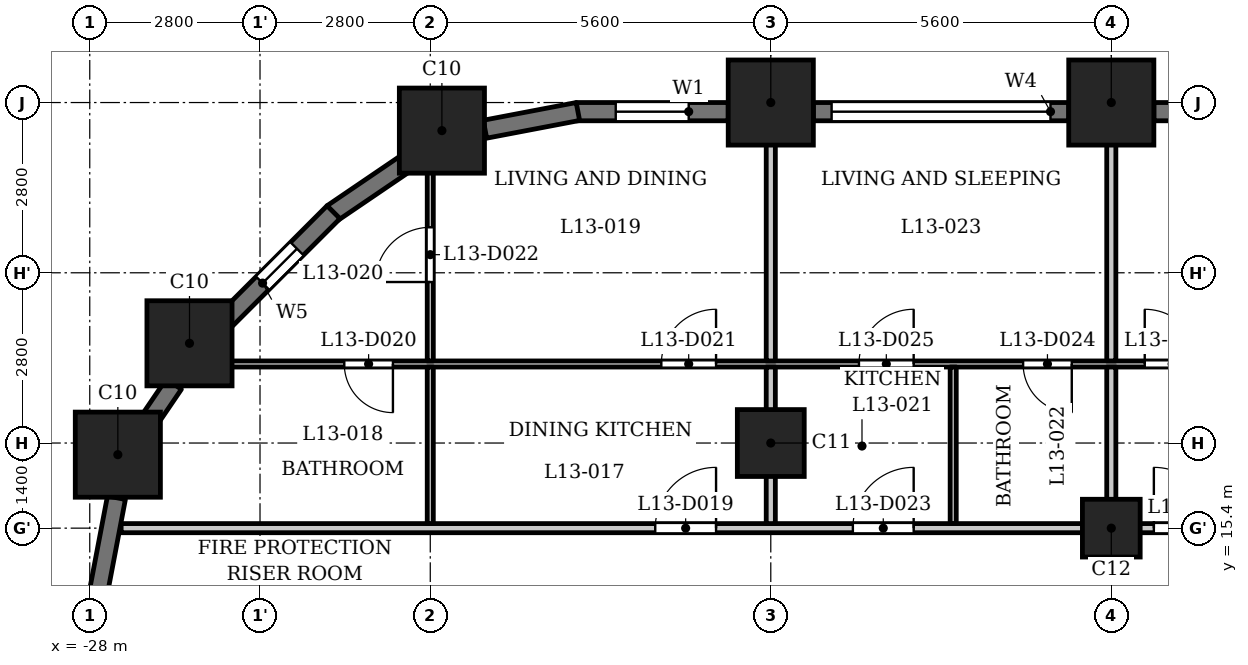
"""IFC4 building model, lengths in metres.
Left out: names, types, materials, properties, quantities, classifications, styles, units other than length and angle.
Written with IfcOpenShell. Run it as: python <this file> out.ifc"""

import sys

from ifc_helpers import new_model, si_unit, direction, frame, frame_2d, origin, origin_2d, place, context, subcontext, project, spatial, rectangle, extrude, element, fill, save


model = new_model("IFC4")
c1 = context("Model", 3, precision=1e-05, world=origin(), true_north=direction((0.0, 1.0)))
c2 = subcontext(c1, "Body", "Model", "MODEL_VIEW")
j1 = project(units=[si_unit("LENGTHUNIT", "METRE"), si_unit("PLANEANGLEUNIT", "RADIAN")], contexts=[c1])
p1 = place(None, origin())
s1 = spatial("IfcSite", under=j1, at=p1, CompositionType="ELEMENT")
p2 = place(p1, origin())
s2 = spatial("IfcBuilding", under=s1, at=p2, CompositionType="ELEMENT")
p3 = place(p2, frame((0.0, 0.0, 55.0)))
s3 = spatial("IfcBuildingStorey", under=s2, at=p3, CompositionType="ELEMENT", Elevation=55.0)
for number, where, z_axis, x_axis in (
    (1, (-11.2, 22.4, 0.0), (0.0, 0.0, 1.0), (1.0, 0.0, 0.0)),
    (2, (-16.8, 22.4, 0.0), (0.0, 0.0, 1.0), (1.0, 0.0, 0.0)),
    (3, (-22.209, 21.938, 0.0), (0.0, 0.0, 1.0), (1.0, 0.0, 0.0)),
    (4, (-26.36, 18.44, 0.0), (0.0, 0.0, 1.0), (1.0, 0.0, 0.0)),
    (5, (-27.538, 16.609, 0.0), (0.0, 0.0, 1.0), (1.0, 0.0, 0.0)),
):
    element("IfcColumn", number, at=place(p3, frame(where, z_axis=z_axis, x_axis=x_axis)), inside=s3, PredefinedType="COLUMN", context=c2, shape_type="SweptSolid", body=[
        extrude(rectangle(XDim=1.4, YDim=1.4, at=origin_2d()), origin(), (0.0, 0.0, 1.0), 3.5),
    ])
p4 = place(p3, frame((-16.8, 16.8, 0.0), z_axis=(0.0, 0.0, 1.0), x_axis=(1.0, 0.0, 0.0)))
e6 = element("IfcColumn", 6, at=p4, inside=s3, PredefinedType="COLUMN", context=c2, shape_type="SweptSolid", body=[
    extrude(rectangle(XDim=1.1, YDim=1.1, at=origin_2d()), origin(), (0.0, 0.0, 1.0), 3.5),
])
p5 = place(p3, frame((-11.2, 15.4, 0.0), z_axis=(0.0, 0.0, 1.0), x_axis=(1.0, 0.0, 0.0)))
e7 = element("IfcColumn", 7, at=p5, inside=s3, PredefinedType="COLUMN", context=c2, shape_type="SweptSolid", body=[
    extrude(rectangle(XDim=0.95, YDim=0.95, at=origin_2d()), origin(), (0.0, 0.0, 1.0), 3.5),
])
p6 = place(p3, frame((-6.3, 22.25, 0.0), z_axis=(0.0, 0.0, 1.0), x_axis=(-1.0, 0.0, 0.0)))
e8 = element("IfcWall", 8, at=p6, inside=s3, PredefinedType="SOLIDWALL", context=c2, shape_type="SweptSolid", body=[
    extrude(rectangle(XDim=4.2, YDim=0.3, at=frame_2d((2.1, 0.0))), origin(), (0.0, 0.0, 1.0), 2.35),
])
p7 = place(p6, frame((0.3, 0.0, 1.2)))
e9 = element("IfcOpeningElement", 9, at=p7, cuts=e8, PredefinedType="OPENING", context=c2, shape_type="SweptSolid", body=[
    extrude(rectangle(XDim=3.6, YDim=0.95, at=frame_2d((1.8, 0.475))), frame((0.0, 0.16, 0.0), z_axis=(0.0, -1.0, 0.0), x_axis=(1.0, 0.0, 0.0)), (0.0, 0.0, 1.0), 0.32),
])
p8 = place(p3, frame((-11.9, 22.25, 0.0), z_axis=(0.0, 0.0, 1.0), x_axis=(-1.0, 0.0, 0.0)))
e10 = element("IfcWall", 10, at=p8, inside=s3, PredefinedType="SOLIDWALL", context=c2, shape_type="SweptSolid", body=[
    extrude(rectangle(XDim=4.2, YDim=0.3, at=frame_2d((2.1, 0.0))), origin(), (0.0, 0.0, 1.0), 2.35),
])
p9 = place(p8, frame((0.3, 0.0, 1.2)))
e11 = element("IfcOpeningElement", 11, at=p9, cuts=e10, PredefinedType="OPENING", context=c2, shape_type="SweptSolid", body=[
    extrude(rectangle(XDim=3.6, YDim=0.95, at=frame_2d((1.8, 0.475))), frame((0.0, 0.16, 0.0), z_axis=(0.0, -1.0, 0.0), x_axis=(1.0, 0.0, 0.0)), (0.0, 0.0, 1.0), 0.32),
])
p10 = place(p3, frame((-17.5, 22.25, 0.0), z_axis=(0.0, 0.0, 1.0), x_axis=(-1.0, 0.0, 0.0)))
e12 = element("IfcWall", 12, at=p10, inside=s3, PredefinedType="SOLIDWALL", context=c2, shape_type="SweptSolid", body=[
    extrude(rectangle(XDim=2.5, YDim=0.3, at=frame_2d((1.25, 0.0))), origin(), (0.0, 0.0, 1.0), 2.35),
])
p11 = place(p10, frame((0.65, 0.0, 0.6)))
e13 = element("IfcOpeningElement", 13, at=p11, cuts=e12, PredefinedType="OPENING", context=c2, shape_type="SweptSolid", body=[
    extrude(rectangle(XDim=1.2, YDim=1.55, at=frame_2d((0.6, 0.775))), frame((0.0, 0.16, 0.0), z_axis=(0.0, -1.0, 0.0), x_axis=(1.0, 0.0, 0.0)), (0.0, 0.0, 1.0), 0.32),
])
p12 = place(p3, frame((-19.972, 22.253, 0.0), z_axis=(0.0, 0.0, 1.0), x_axis=(-0.982297345734, -0.187328386968, 0.0)))
e14 = element("IfcWall", 14, at=p12, inside=s3, PredefinedType="SOLIDWALL", context=c2, shape_type="SweptSolid", body=[
    extrude(rectangle(XDim=1.556, YDim=0.3, at=frame_2d((0.778, 0.0))), origin(), (0.0, 0.0, 1.0), 2.35),
])
p13 = place(p3, frame((-22.726, 21.454, 0.0), z_axis=(0.0, 0.0, 1.0), x_axis=(-0.827019875346, -0.562172683241, 0.0)))
e15 = element("IfcWall", 15, at=p13, inside=s3, PredefinedType="SOLIDWALL", context=c2, shape_type="SweptSolid", body=[
    extrude(rectangle(XDim=1.556, YDim=0.3, at=frame_2d((0.778, 0.0))), origin(), (0.0, 0.0, 1.0), 2.35),
])
p14 = place(p3, frame((-23.991, 20.597, 0.0), z_axis=(0.0, 0.0, 1.0), x_axis=(-0.707106781187, -0.707106781187, 0.0)))
e16 = element("IfcWall", 16, at=p14, inside=s3, PredefinedType="SOLIDWALL", context=c2, shape_type="SweptSolid", body=[
    extrude(rectangle(XDim=2.5, YDim=0.3, at=frame_2d((1.25, 0.0))), origin(), (0.0, 0.0, 1.0), 2.35),
])
p15 = place(p14, frame((0.85, 0.0, 0.6)))
e17 = element("IfcOpeningElement", 17, at=p15, cuts=e16, PredefinedType="OPENING", context=c2, shape_type="SweptSolid", body=[
    extrude(rectangle(XDim=0.8, YDim=1.55, at=frame_2d((0.4, 0.775))), frame((0.0, 0.16, 0.0), z_axis=(0.0, -1.0, 0.0), x_axis=(1.0, 0.0, 0.0)), (0.0, 0.0, 1.0), 0.32),
])
p16 = place(p3, frame((-26.617, 17.769, 0.0), z_axis=(0.0, 0.0, 1.0), x_axis=(-0.562000651531, -0.827136788977, 0.0)))
e18 = element("IfcWall", 18, at=p16, inside=s3, PredefinedType="SOLIDWALL", context=c2, shape_type="SweptSolid", body=[
    extrude(rectangle(XDim=0.777, YDim=0.3, at=frame_2d((0.389, 0.0))), origin(), (0.0, 0.0, 1.0), 3.2),
])
p17 = place(p3, frame((-27.561, 15.9, 0.0), z_axis=(0.0, 0.0, 1.0), x_axis=(-0.187328386968, -0.982297345734, 0.0)))
e19 = element("IfcWall", 19, at=p17, inside=s3, PredefinedType="SOLIDWALL", context=c2, shape_type="SweptSolid", body=[
    extrude(rectangle(XDim=1.556, YDim=0.3, at=frame_2d((0.778, 0.0))), origin(), (0.0, 0.0, 1.0), 2.35),
])
p18 = place(p3, frame((-27.484, 15.4, 0.0), z_axis=(0.0, 0.0, 1.0), x_axis=(1.0, 0.0, 0.0)))
e20 = element("IfcWall", 20, at=p18, inside=s3, PredefinedType="PARTITIONING", context=c2, shape_type="SweptSolid", body=[
    extrude(rectangle(XDim=54.968, YDim=0.15, at=frame_2d((27.484, 0.0))), origin(), (0.0, 0.0, 1.0), 3.2),
])
p19 = place(p18, frame((8.784, 0.0, 0.0)))
e21 = element("IfcOpeningElement", 21, at=p19, cuts=e20, PredefinedType="OPENING", context=c2, shape_type="SweptSolid", body=[
    extrude(rectangle(XDim=1.0, YDim=2.1, at=frame_2d((0.5, 1.05))), frame((0.0, 0.085, 0.0), z_axis=(0.0, -1.0, 0.0), x_axis=(1.0, 0.0, 0.0)), (0.0, 0.0, 1.0), 0.17),
])
p20 = place(p18, frame((12.034, 0.0, 0.0)))
e22 = element("IfcOpeningElement", 22, at=p20, cuts=e20, PredefinedType="OPENING", context=c2, shape_type="SweptSolid", body=[
    extrude(rectangle(XDim=1.0, YDim=2.1, at=frame_2d((0.5, 1.05))), frame((0.0, 0.085, 0.0), z_axis=(0.0, -1.0, 0.0), x_axis=(1.0, 0.0, 0.0)), (0.0, 0.0, 1.0), 0.17),
])
p21 = place(p18, frame((16.984, 0.0, 0.0)))
e23 = element("IfcOpeningElement", 23, at=p21, cuts=e20, PredefinedType="OPENING", context=c2, shape_type="SweptSolid", body=[
    extrude(rectangle(XDim=1.0, YDim=2.1, at=frame_2d((0.5, 1.05))), frame((0.0, 0.085, 0.0), z_axis=(0.0, -1.0, 0.0), x_axis=(1.0, 0.0, 0.0)), (0.0, 0.0, 1.0), 0.17),
])
p22 = place(p18, frame((28.184, 0.0, 0.0)))
e24 = element("IfcOpeningElement", 24, at=p22, cuts=e20, PredefinedType="OPENING", context=c2, shape_type="SweptSolid", body=[
    extrude(rectangle(XDim=1.0, YDim=2.1, at=frame_2d((0.5, 1.05))), frame((0.0, 0.085, 0.0), z_axis=(0.0, -1.0, 0.0), x_axis=(1.0, 0.0, 0.0)), (0.0, 0.0, 1.0), 0.17),
])
p23 = place(p18, frame((48.234, 0.0, 0.0)))
e25 = element("IfcOpeningElement", 25, at=p23, cuts=e20, PredefinedType="OPENING", context=c2, shape_type="SweptSolid", body=[
    extrude(rectangle(XDim=1.0, YDim=2.1, at=frame_2d((0.5, 1.05))), frame((0.0, 0.085, 0.0), z_axis=(0.0, -1.0, 0.0), x_axis=(1.0, 0.0, 0.0)), (0.0, 0.0, 1.0), 0.17),
])
p24 = place(p3, frame((-26.44, 18.1, 0.0), z_axis=(0.0, 0.0, 1.0), x_axis=(1.0, 0.0, 0.0)))
e26 = element("IfcWall", 26, at=p24, inside=s3, PredefinedType="PARTITIONING", context=c2, shape_type="SweptSolid", body=[
    extrude(rectangle(XDim=52.63, YDim=0.1, at=frame_2d((26.315, 0.0))), origin(), (0.0, 0.0, 1.0), 3.2),
])
p25 = place(p24, frame((2.626, 0.0, 0.0)))
e27 = element("IfcOpeningElement", 27, at=p25, cuts=e26, PredefinedType="OPENING", context=c2, shape_type="SweptSolid", body=[
    extrude(rectangle(XDim=0.8, YDim=2.1, at=frame_2d((0.4, 1.05))), frame((0.0, 0.06, 0.0), z_axis=(0.0, -1.0, 0.0), x_axis=(1.0, 0.0, 0.0)), (0.0, 0.0, 1.0), 0.12),
])
p26 = place(p24, frame((7.84, 0.0, 0.0)))
e28 = element("IfcOpeningElement", 28, at=p26, cuts=e26, PredefinedType="OPENING", context=c2, shape_type="SweptSolid", body=[
    extrude(rectangle(XDim=0.9, YDim=2.1, at=frame_2d((0.45, 1.05))), frame((0.0, 0.06, 0.0), z_axis=(0.0, -1.0, 0.0), x_axis=(1.0, 0.0, 0.0)), (0.0, 0.0, 1.0), 0.12),
])
p27 = place(p24, frame((13.79, 0.0, 0.0)))
e29 = element("IfcOpeningElement", 29, at=p27, cuts=e26, PredefinedType="OPENING", context=c2, shape_type="SweptSolid", body=[
    extrude(rectangle(XDim=0.8, YDim=2.1, at=frame_2d((0.4, 1.05))), frame((0.0, 0.06, 0.0), z_axis=(0.0, -1.0, 0.0), x_axis=(1.0, 0.0, 0.0)), (0.0, 0.0, 1.0), 0.12),
])
p28 = place(p24, frame((11.09, 0.0, 0.0)))
e30 = element("IfcOpeningElement", 30, at=p28, cuts=e26, PredefinedType="OPENING", context=c2, shape_type="SweptSolid", body=[
    extrude(rectangle(XDim=0.9, YDim=2.1, at=frame_2d((0.45, 1.05))), frame((0.0, 0.06, 0.0), z_axis=(0.0, -1.0, 0.0), x_axis=(1.0, 0.0, 0.0)), (0.0, 0.0, 1.0), 0.12),
])
p29 = place(p24, frame((21.49, 0.0, 0.0)))
e31 = element("IfcOpeningElement", 31, at=p29, cuts=e26, PredefinedType="OPENING", context=c2, shape_type="SweptSolid", body=[
    extrude(rectangle(XDim=0.8, YDim=2.1, at=frame_2d((0.4, 1.05))), frame((0.0, 0.06, 0.0), z_axis=(0.0, -1.0, 0.0), x_axis=(1.0, 0.0, 0.0)), (0.0, 0.0, 1.0), 0.12),
])
p30 = place(p24, frame((15.79, 0.0, 0.0)))
e32 = element("IfcOpeningElement", 32, at=p30, cuts=e26, PredefinedType="OPENING", context=c2, shape_type="SweptSolid", body=[
    extrude(rectangle(XDim=0.9, YDim=2.1, at=frame_2d((0.45, 1.05))), frame((0.0, 0.06, 0.0), z_axis=(0.0, -1.0, 0.0), x_axis=(1.0, 0.0, 0.0)), (0.0, 0.0, 1.0), 0.12),
])
p31 = place(p24, frame((27.49, 0.0, 0.0)))
e33 = element("IfcOpeningElement", 33, at=p31, cuts=e26, PredefinedType="OPENING", context=c2, shape_type="SweptSolid", body=[
    extrude(rectangle(XDim=0.9, YDim=2.1, at=frame_2d((0.45, 1.05))), frame((0.0, 0.06, 0.0), z_axis=(0.0, -1.0, 0.0), x_axis=(1.0, 0.0, 0.0)), (0.0, 0.0, 1.0), 0.12),
])
p32 = place(p24, frame((29.74, 0.0, 0.0)))
e34 = element("IfcOpeningElement", 34, at=p32, cuts=e26, PredefinedType="OPENING", context=c2, shape_type="SweptSolid", body=[
    extrude(rectangle(XDim=0.9, YDim=2.1, at=frame_2d((0.45, 1.05))), frame((0.0, 0.06, 0.0), z_axis=(0.0, -1.0, 0.0), x_axis=(1.0, 0.0, 0.0)), (0.0, 0.0, 1.0), 0.12),
])
p33 = place(p24, frame((35.84, 0.0, 0.0)))
e35 = element("IfcOpeningElement", 35, at=p33, cuts=e26, PredefinedType="OPENING", context=c2, shape_type="SweptSolid", body=[
    extrude(rectangle(XDim=0.9, YDim=2.1, at=frame_2d((0.45, 1.05))), frame((0.0, 0.06, 0.0), z_axis=(0.0, -1.0, 0.0), x_axis=(1.0, 0.0, 0.0)), (0.0, 0.0, 1.0), 0.12),
])
p34 = place(p24, frame((50.74, 0.0, 0.0)))
e36 = element("IfcOpeningElement", 36, at=p34, cuts=e26, PredefinedType="OPENING", context=c2, shape_type="SweptSolid", body=[
    extrude(rectangle(XDim=0.8, YDim=2.1, at=frame_2d((0.4, 1.05))), frame((0.0, 0.06, 0.0), z_axis=(0.0, -1.0, 0.0), x_axis=(1.0, 0.0, 0.0)), (0.0, 0.0, 1.0), 0.12),
])
p35 = place(p24, frame((47.29, 0.0, 0.0)))
e37 = element("IfcOpeningElement", 37, at=p35, cuts=e26, PredefinedType="OPENING", context=c2, shape_type="SweptSolid", body=[
    extrude(rectangle(XDim=0.9, YDim=2.1, at=frame_2d((0.45, 1.05))), frame((0.0, 0.06, 0.0), z_axis=(0.0, -1.0, 0.0), x_axis=(1.0, 0.0, 0.0)), (0.0, 0.0, 1.0), 0.12),
])
p36 = place(p3, frame((-22.4, 15.475, 0.0), z_axis=(0.0, 0.0, 1.0), x_axis=(0.0, 1.0, 0.0)))
e38 = element("IfcWall", 38, at=p36, inside=s3, PredefinedType="PARTITIONING", context=c2, shape_type="SweptSolid", body=[
    extrude(rectangle(XDim=2.575, YDim=0.1, at=frame_2d((1.288, 0.0))), origin(), (0.0, 0.0, 1.0), 3.2),
])
p37 = place(p3, frame((-22.4, 18.15, 0.0), z_axis=(0.0, 0.0, 1.0), x_axis=(0.0, 1.0, 0.0)))
e39 = element("IfcWall", 39, at=p37, inside=s3, PredefinedType="PARTITIONING", context=c2, shape_type="SweptSolid", body=[
    extrude(rectangle(XDim=3.57, YDim=0.1, at=frame_2d((1.785, 0.0))), origin(), (0.0, 0.0, 1.0), 3.2),
])
p38 = place(p37, frame((1.298, 0.0, 0.0)))
e40 = element("IfcOpeningElement", 40, at=p38, cuts=e39, PredefinedType="OPENING", context=c2, shape_type="SweptSolid", body=[
    extrude(rectangle(XDim=0.9, YDim=2.1, at=frame_2d((0.45, 1.05))), frame((0.0, 0.06, 0.0), z_axis=(0.0, -1.0, 0.0), x_axis=(1.0, 0.0, 0.0)), (0.0, 0.0, 1.0), 0.12),
])
p39 = place(p3, frame((-16.8, 15.475, 0.0), z_axis=(0.0, 0.0, 1.0), x_axis=(0.0, 1.0, 0.0)))
e41 = element("IfcWall", 41, at=p39, inside=s3, PredefinedType="PARTITIONING", context=c2, shape_type="SweptSolid", body=[
    extrude(rectangle(XDim=2.575, YDim=0.15, at=frame_2d((1.288, 0.0))), origin(), (0.0, 0.0, 1.0), 3.2),
])
p40 = place(p3, frame((-16.8, 18.15, 0.0), z_axis=(0.0, 0.0, 1.0), x_axis=(0.0, 1.0, 0.0)))
e42 = element("IfcWall", 42, at=p40, inside=s3, PredefinedType="PARTITIONING", context=c2, shape_type="SweptSolid", body=[
    extrude(rectangle(XDim=4.93, YDim=0.15, at=frame_2d((2.465, 0.0))), origin(), (0.0, 0.0, 1.0), 3.2),
])
p41 = place(p3, frame((-13.8, 15.475, 0.0), z_axis=(0.0, 0.0, 1.0), x_axis=(0.0, 1.0, 0.0)))
e43 = element("IfcWall", 43, at=p41, inside=s3, PredefinedType="PARTITIONING", context=c2, shape_type="SweptSolid", body=[
    extrude(rectangle(XDim=2.575, YDim=0.1, at=frame_2d((1.288, 0.0))), origin(), (0.0, 0.0, 1.0), 3.2),
])
p42 = place(p3, frame((-11.2, 15.475, 0.0), z_axis=(0.0, 0.0, 1.0), x_axis=(0.0, 1.0, 0.0)))
e44 = element("IfcWall", 44, at=p42, inside=s3, PredefinedType="PARTITIONING", context=c2, shape_type="SweptSolid", body=[
    extrude(rectangle(XDim=2.575, YDim=0.15, at=frame_2d((1.288, 0.0))), origin(), (0.0, 0.0, 1.0), 3.2),
])
p43 = place(p3, frame((-11.2, 18.15, 0.0), z_axis=(0.0, 0.0, 1.0), x_axis=(0.0, 1.0, 0.0)))
e45 = element("IfcWall", 45, at=p43, inside=s3, PredefinedType="PARTITIONING", context=c2, shape_type="SweptSolid", body=[
    extrude(rectangle(XDim=4.93, YDim=0.15, at=frame_2d((2.465, 0.0))), origin(), (0.0, 0.0, 1.0), 3.2),
])
p44 = place(p19, origin())
e46 = element("IfcDoor", 46, at=p44, inside=s3, OperationType="SINGLE_SWING_LEFT", PredefinedType="DOOR", context=c2, shape_type="SweptSolid", body=[
    extrude(rectangle(XDim=1.0, YDim=2.1, at=frame_2d((0.5, 1.05))), frame((0.0, 0.025, 0.0), z_axis=(0.0, -1.0, 0.0), x_axis=(1.0, 0.0, 0.0)), (0.0, 0.0, 1.0), 0.05),
])
fill(e21, e46)
p45 = place(p25, origin())
e47 = element("IfcDoor", 47, at=p45, inside=s3, OperationType="SINGLE_SWING_RIGHT", PredefinedType="DOOR", context=c2, shape_type="SweptSolid", body=[
    extrude(rectangle(XDim=0.8, YDim=2.1, at=frame_2d((0.4, 1.05))), frame((0.0, 0.025, 0.0), z_axis=(0.0, -1.0, 0.0), x_axis=(1.0, 0.0, 0.0)), (0.0, 0.0, 1.0), 0.05),
])
fill(e27, e47)
p46 = place(p26, origin())
e48 = element("IfcDoor", 48, at=p46, inside=s3, OperationType="SINGLE_SWING_LEFT", PredefinedType="DOOR", context=c2, shape_type="SweptSolid", body=[
    extrude(rectangle(XDim=0.9, YDim=2.1, at=frame_2d((0.45, 1.05))), frame((0.0, 0.025, 0.0), z_axis=(0.0, -1.0, 0.0), x_axis=(1.0, 0.0, 0.0)), (0.0, 0.0, 1.0), 0.05),
])
fill(e28, e48)
p47 = place(p38, origin())
e49 = element("IfcDoor", 49, at=p47, inside=s3, OperationType="SINGLE_SWING_RIGHT", PredefinedType="DOOR", context=c2, shape_type="SweptSolid", body=[
    extrude(rectangle(XDim=0.9, YDim=2.1, at=frame_2d((0.45, 1.05))), frame((0.0, 0.025, 0.0), z_axis=(0.0, -1.0, 0.0), x_axis=(1.0, 0.0, 0.0)), (0.0, 0.0, 1.0), 0.05),
])
fill(e40, e49)
p48 = place(p20, origin())
e50 = element("IfcDoor", 50, at=p48, inside=s3, OperationType="SINGLE_SWING_LEFT", PredefinedType="DOOR", context=c2, shape_type="SweptSolid", body=[
    extrude(rectangle(XDim=1.0, YDim=2.1, at=frame_2d((0.5, 1.05))), frame((0.0, 0.025, 0.0), z_axis=(0.0, -1.0, 0.0), x_axis=(1.0, 0.0, 0.0)), (0.0, 0.0, 1.0), 0.05),
])
fill(e22, e50)
p49 = place(p27, origin())
e51 = element("IfcDoor", 51, at=p49, inside=s3, OperationType="SINGLE_SWING_RIGHT", PredefinedType="DOOR", context=c2, shape_type="SweptSolid", body=[
    extrude(rectangle(XDim=0.8, YDim=2.1, at=frame_2d((0.4, 1.05))), frame((0.0, 0.025, 0.0), z_axis=(0.0, -1.0, 0.0), x_axis=(1.0, 0.0, 0.0)), (0.0, 0.0, 1.0), 0.05),
])
fill(e29, e51)
p50 = place(p28, origin())
e52 = element("IfcDoor", 52, at=p50, inside=s3, OperationType="SINGLE_SWING_LEFT", PredefinedType="DOOR", context=c2, shape_type="SweptSolid", body=[
    extrude(rectangle(XDim=0.9, YDim=2.1, at=frame_2d((0.45, 1.05))), frame((0.0, 0.025, 0.0), z_axis=(0.0, -1.0, 0.0), x_axis=(1.0, 0.0, 0.0)), (0.0, 0.0, 1.0), 0.05),
])
fill(e30, e52)
p51 = place(p21, origin())
e53 = element("IfcDoor", 53, at=p51, inside=s3, OperationType="SINGLE_SWING_RIGHT", PredefinedType="DOOR", context=c2, shape_type="SweptSolid", body=[
    extrude(rectangle(XDim=1.0, YDim=2.1, at=frame_2d((0.5, 1.05))), frame((0.0, 0.025, 0.0), z_axis=(0.0, -1.0, 0.0), x_axis=(1.0, 0.0, 0.0)), (0.0, 0.0, 1.0), 0.05),
])
fill(e23, e53)
p52 = place(p30, origin())
e54 = element("IfcDoor", 54, at=p52, inside=s3, OperationType="SINGLE_SWING_RIGHT", PredefinedType="DOOR", context=c2, shape_type="SweptSolid", body=[
    extrude(rectangle(XDim=0.9, YDim=2.1, at=frame_2d((0.45, 1.05))), frame((0.0, 0.025, 0.0), z_axis=(0.0, -1.0, 0.0), x_axis=(1.0, 0.0, 0.0)), (0.0, 0.0, 1.0), 0.05),
])
fill(e32, e54)
p53 = place(p9, origin())
e55 = element("IfcWindow", 55, at=p53, inside=s3, PartitioningType="SINGLE_PANEL", PredefinedType="WINDOW", context=c2, shape_type="SweptSolid", body=[
    extrude(rectangle(XDim=3.6, YDim=0.95, at=frame_2d((1.8, 0.475))), frame((0.0, 0.03, 0.0), z_axis=(0.0, -1.0, 0.0), x_axis=(1.0, 0.0, 0.0)), (0.0, 0.0, 1.0), 0.06),
])
fill(e11, e55)
p54 = place(p11, origin())
e56 = element("IfcWindow", 56, at=p54, inside=s3, PartitioningType="SINGLE_PANEL", PredefinedType="WINDOW", context=c2, shape_type="SweptSolid", body=[
    extrude(rectangle(XDim=1.2, YDim=1.55, at=frame_2d((0.6, 0.775))), frame((0.0, 0.03, 0.0), z_axis=(0.0, -1.0, 0.0), x_axis=(1.0, 0.0, 0.0)), (0.0, 0.0, 1.0), 0.06),
])
fill(e13, e56)
p55 = place(p15, origin())
e57 = element("IfcWindow", 57, at=p55, inside=s3, PartitioningType="SINGLE_PANEL", PredefinedType="WINDOW", context=c2, shape_type="SweptSolid", body=[
    extrude(rectangle(XDim=0.8, YDim=1.55, at=frame_2d((0.4, 0.775))), frame((0.0, 0.03, 0.0), z_axis=(0.0, -1.0, 0.0), x_axis=(1.0, 0.0, 0.0)), (0.0, 0.0, 1.0), 0.06),
])
fill(e17, e57)
save(model, sys.argv[1])
